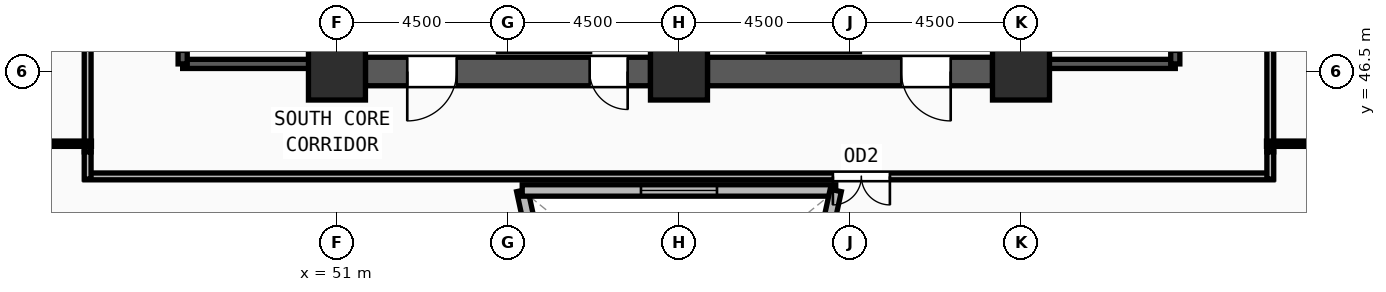
"""IFC4 building model, lengths in metres.
Left out: names, types, materials, properties, quantities, classifications, styles, units other than length and angle.
Written with IfcOpenShell. Run it as: python <this file> out.ifc"""

import sys

from ifc_helpers import new_model, si_unit, direction, frame, frame_2d, origin, origin_2d, place, context, subcontext, project, spatial, rectangle, extrude, source, transform, mapped, element, fill, save


model = new_model("IFC4")
c1 = context("Model", 3, precision=1e-05, world=origin(), true_north=direction((0.0, 1.0)))
c2 = subcontext(c1, "Body", "Model", "MODEL_VIEW")
j1 = project(units=[si_unit("LENGTHUNIT", "METRE"), si_unit("PLANEANGLEUNIT", "RADIAN")], contexts=[c1])
p1 = place(None, origin())
s1 = spatial("IfcSite", under=j1, at=p1, CompositionType="ELEMENT")
p2 = place(p1, origin())
s2 = spatial("IfcBuilding", under=s1, at=p2, CompositionType="ELEMENT")
p3 = place(p2, frame((0.0, 0.0, 113.25)))
s3 = spatial("IfcBuildingStorey", under=s2, at=p3, CompositionType="ELEMENT", Elevation=113.25)
m1 = source(origin(), c2, "Body", "SweptSolid", [
    extrude(rectangle(XDim=1.5, YDim=1.5, at=origin_2d()), origin(), (0.0, 0.0, 1.0), 3.75),
])
for number, where, z_axis, x_axis in (
    (1, (51.0, 46.5, 0.0), (0.0, 0.0, 1.0), (1.0, 0.0, 0.0)),
    (2, (60.0, 46.5, 0.0), (0.0, 0.0, 1.0), (1.0, 0.0, 0.0)),
    (3, (69.0, 46.5, 0.0), (0.0, 0.0, 1.0), (1.0, 0.0, 0.0)),
):
    element("IfcColumn", number, at=place(p3, frame(where, z_axis=z_axis, x_axis=x_axis)), inside=s3, PredefinedType="COLUMN", context=c2, shape_type="MappedRepresentation", body=[
        mapped(m1, transform((0.0, 0.0, 0.0), x_axis=(1.0, 0.0, 0.0), y_axis=(0.0, 1.0, 0.0), z_axis=(0.0, 0.0, 1.0), scale=1.0)),
    ])
p4 = place(p3, frame((68.25, 46.5, 0.0), z_axis=(0.0, 0.0, 1.0), x_axis=(-1.0, 0.0, 0.0)))
e4 = element("IfcWall", 4, at=p4, inside=s3, PredefinedType="SHEAR", context=c2, shape_type="SweptSolid", body=[
    extrude(rectangle(XDim=7.5, YDim=0.75, at=frame_2d((3.75, 0.0))), origin(), (0.0, 0.0, 1.0), 3.57),
])
m2 = source(origin(), c2, "Body", "SweptSolid", [
    extrude(rectangle(XDim=1.3, YDim=2.2, at=frame_2d((0.65, 1.1))), frame((0.0, 0.385, 0.0), z_axis=(0.0, -1.0, 0.0), x_axis=(1.0, 0.0, 0.0)), (0.0, 0.0, 1.0), 0.77),
])
p5 = place(p4, frame((1.1, 0.0, 0.0)))
e5 = element("IfcOpeningElement", 5, at=p5, cuts=e4, PredefinedType="OPENING", context=c2, shape_type="MappedRepresentation", body=[
    mapped(m2, transform((0.0, 0.0, 0.0), x_axis=(1.0, 0.0, 0.0), y_axis=(0.0, 1.0, 0.0), z_axis=(0.0, 0.0, 1.0), scale=1.0)),
])
p6 = place(p3, frame((59.25, 46.5, 0.0), z_axis=(0.0, 0.0, 1.0), x_axis=(-1.0, 0.0, 0.0)))
e6 = element("IfcWall", 6, at=p6, inside=s3, PredefinedType="SHEAR", context=c2, shape_type="SweptSolid", body=[
    extrude(rectangle(XDim=7.5, YDim=0.75, at=frame_2d((3.75, 0.0))), origin(), (0.0, 0.0, 1.0), 3.57),
])
p7 = place(p6, frame((5.1, 0.0, 0.0)))
e7 = element("IfcOpeningElement", 7, at=p7, cuts=e6, PredefinedType="OPENING", context=c2, shape_type="MappedRepresentation", body=[
    mapped(m2, transform((0.0, 0.0, 0.0), x_axis=(1.0, 0.0, 0.0), y_axis=(0.0, 1.0, 0.0), z_axis=(0.0, 0.0, 1.0), scale=1.0)),
])
m3 = source(origin(), c2, "Body", "SweptSolid", [
    extrude(rectangle(XDim=1.0, YDim=2.2, at=frame_2d((0.5, 1.1))), frame((0.0, 0.385, 0.0), z_axis=(0.0, -1.0, 0.0), x_axis=(1.0, 0.0, 0.0)), (0.0, 0.0, 1.0), 0.77),
])
p8 = place(p6, frame((0.6, 0.0, 0.0)))
e8 = element("IfcOpeningElement", 8, at=p8, cuts=e6, PredefinedType="OPENING", context=c2, shape_type="MappedRepresentation", body=[
    mapped(m3, transform((0.0, 0.0, 0.0), x_axis=(1.0, 0.0, 0.0), y_axis=(0.0, 1.0, 0.0), z_axis=(0.0, 0.0, 1.0), scale=1.0)),
])
p9 = place(p3, frame((46.94, 46.7, 0.0), z_axis=(0.0, 0.0, 1.0), x_axis=(1.0, 0.0, 0.0)))
e9 = element("IfcWall", 9, at=p9, inside=s3, PredefinedType="SOLIDWALL", context=c2, shape_type="SweptSolid", body=[
    extrude(rectangle(XDim=3.44, YDim=0.24, at=frame_2d((1.72, 0.0))), origin(), (0.0, 0.0, 1.0), 3.57),
])
p10 = place(p3, frame((50.38, 46.7, 0.0), z_axis=(0.0, 0.0, 1.0), x_axis=(0.0, 1.0, 0.0)))
e10 = element("IfcWall", 10, at=p10, inside=s3, PredefinedType="SOLIDWALL", context=c2, shape_type="SweptSolid", body=[
    extrude(rectangle(XDim=7.82, YDim=0.24, at=frame_2d((3.91, 0.0))), origin(), (0.0, 0.0, 1.0), 3.57),
])
p11 = place(p3, frame((46.94, 54.52, 0.0), z_axis=(0.0, 0.0, 1.0), x_axis=(0.0, -1.0, 0.0)))
e11 = element("IfcWall", 11, at=p11, inside=s3, PredefinedType="SOLIDWALL", context=c2, shape_type="SweptSolid", body=[
    extrude(rectangle(XDim=7.82, YDim=0.24, at=frame_2d((3.91, 0.0))), origin(), (0.0, 0.0, 1.0), 3.57),
])
m4 = source(origin(), c2, "Body", "SweptSolid", [
    extrude(rectangle(XDim=1.2, YDim=2.2, at=frame_2d((0.6, 1.1))), frame((0.0, 0.13, 0.0), z_axis=(0.0, -1.0, 0.0), x_axis=(1.0, 0.0, 0.0)), (0.0, 0.0, 1.0), 0.26),
])
p12 = place(p11, frame((6.3, 0.0, 0.0)))
e12 = element("IfcOpeningElement", 12, at=p12, cuts=e11, PredefinedType="OPENING", context=c2, shape_type="MappedRepresentation", body=[
    mapped(m4, transform((0.0, 0.0, 0.0), x_axis=(1.0, 0.0, 0.0), y_axis=(0.0, 1.0, 0.0), z_axis=(0.0, 0.0, 1.0), scale=1.0)),
])
p13 = place(p3, frame((69.62, 46.7, 0.0), z_axis=(0.0, 0.0, 1.0), x_axis=(1.0, 0.0, 0.0)))
e13 = element("IfcWall", 13, at=p13, inside=s3, PredefinedType="SOLIDWALL", context=c2, shape_type="SweptSolid", body=[
    extrude(rectangle(XDim=3.44, YDim=0.24, at=frame_2d((1.72, 0.0))), origin(), (0.0, 0.0, 1.0), 3.57),
])
p14 = place(p3, frame((73.06, 46.7, 0.0), z_axis=(0.0, 0.0, 1.0), x_axis=(0.0, 1.0, 0.0)))
e14 = element("IfcWall", 14, at=p14, inside=s3, PredefinedType="SOLIDWALL", context=c2, shape_type="SweptSolid", body=[
    extrude(rectangle(XDim=7.82, YDim=0.24, at=frame_2d((3.91, 0.0))), origin(), (0.0, 0.0, 1.0), 3.57),
])
p15 = place(p14, frame((0.32, 0.0, 0.0)))
e15 = element("IfcOpeningElement", 15, at=p15, cuts=e14, PredefinedType="OPENING", context=c2, shape_type="MappedRepresentation", body=[
    mapped(m4, transform((0.0, 0.0, 0.0), x_axis=(1.0, 0.0, 0.0), y_axis=(0.0, 1.0, 0.0), z_axis=(0.0, 0.0, 1.0), scale=1.0)),
])
p16 = place(p3, frame((69.62, 54.52, 0.0), z_axis=(0.0, 0.0, 1.0), x_axis=(0.0, -1.0, 0.0)))
e16 = element("IfcWall", 16, at=p16, inside=s3, PredefinedType="SOLIDWALL", context=c2, shape_type="SweptSolid", body=[
    extrude(rectangle(XDim=7.82, YDim=0.24, at=frame_2d((3.91, 0.0))), origin(), (0.0, 0.0, 1.0), 3.57),
])
p17 = place(p3, frame((57.319, 36.692, 0.0), z_axis=(0.0, 0.0, 1.0), x_axis=(-0.211354012172, 0.977409577168, 0.0)))
e17 = element("IfcWall", 17, at=p17, inside=s3, PredefinedType="SOLIDWALL", context=c2, shape_type="SweptSolid", body=[
    extrude(rectangle(XDim=6.833, YDim=0.3, at=frame_2d((3.416, 0.0))), origin(), (0.0, 0.0, 1.0), 3.57),
])
m5 = source(origin(), c2, "Body", "SweptSolid", [
    extrude(rectangle(XDim=2.0, YDim=1.9, at=frame_2d((1.0, 0.95))), frame((0.0, 0.16, 0.0), z_axis=(0.0, -1.0, 0.0), x_axis=(1.0, 0.0, 0.0)), (0.0, 0.0, 1.0), 0.32),
])
p18 = place(p17, frame((2.416, 0.0, 0.55)))
e18 = element("IfcOpeningElement", 18, at=p18, cuts=e17, PredefinedType="OPENING", context=c2, shape_type="MappedRepresentation", body=[
    mapped(m5, transform((0.0, 0.0, 0.0), x_axis=(1.0, 0.0, 0.0), y_axis=(0.0, 1.0, 0.0), z_axis=(0.0, 0.0, 1.0), scale=1.0)),
])
p19 = place(p3, frame((55.875, 43.37, 0.0), z_axis=(0.0, 0.0, 1.0), x_axis=(1.0, 0.0, 0.0)))
e19 = element("IfcWall", 19, at=p19, inside=s3, PredefinedType="SOLIDWALL", context=c2, shape_type="SweptSolid", body=[
    extrude(rectangle(XDim=8.25, YDim=0.3, at=frame_2d((4.125, 0.0))), origin(), (0.0, 0.0, 1.0), 3.57),
])
p20 = place(p19, frame((3.125, 0.0, 0.55)))
e20 = element("IfcOpeningElement", 20, at=p20, cuts=e19, PredefinedType="OPENING", context=c2, shape_type="MappedRepresentation", body=[
    mapped(m5, transform((0.0, 0.0, 0.0), x_axis=(1.0, 0.0, 0.0), y_axis=(0.0, 1.0, 0.0), z_axis=(0.0, 0.0, 1.0), scale=1.0)),
])
p21 = place(p3, frame((64.125, 43.37, 0.0), z_axis=(0.0, 0.0, 1.0), x_axis=(-0.211354012172, -0.977409577168, 0.0)))
e21 = element("IfcWall", 21, at=p21, inside=s3, PredefinedType="SOLIDWALL", context=c2, shape_type="SweptSolid", body=[
    extrude(rectangle(XDim=6.833, YDim=0.3, at=frame_2d((3.416, 0.0))), origin(), (0.0, 0.0, 1.0), 3.57),
])
p22 = place(p21, frame((2.416, 0.0, 0.55)))
e22 = element("IfcOpeningElement", 22, at=p22, cuts=e21, PredefinedType="OPENING", context=c2, shape_type="MappedRepresentation", body=[
    mapped(m5, transform((0.0, 0.0, 0.0), x_axis=(1.0, 0.0, 0.0), y_axis=(0.0, 1.0, 0.0), z_axis=(0.0, 0.0, 1.0), scale=1.0)),
])
p23 = place(p3, frame((44.44, 44.385, 0.0), z_axis=(0.0, 0.0, 1.0), x_axis=(0.0, 1.0, 0.0)))
e23 = element("IfcWall", 23, at=p23, inside=s3, PredefinedType="PARTITIONING", context=c2, shape_type="SweptSolid", body=[
    extrude(rectangle(XDim=7.83, YDim=0.18, at=frame_2d((3.915, 0.0))), origin(), (0.0, 0.0, 1.0), 3.57),
])
m6 = source(origin(), c2, "Body", "SweptSolid", [
    extrude(rectangle(XDim=1.0, YDim=2.2, at=frame_2d((0.5, 1.1))), frame((0.0, 0.1, 0.0), z_axis=(0.0, -1.0, 0.0), x_axis=(1.0, 0.0, 0.0)), (0.0, 0.0, 1.0), 0.2),
])
p24 = place(p23, frame((3.415, 0.0, 0.0)))
e24 = element("IfcOpeningElement", 24, at=p24, cuts=e23, PredefinedType="OPENING", context=c2, shape_type="MappedRepresentation", body=[
    mapped(m6, transform((0.0, 0.0, 0.0), x_axis=(1.0, 0.0, 0.0), y_axis=(0.0, 1.0, 0.0), z_axis=(0.0, 0.0, 1.0), scale=1.0)),
])
p25 = place(p3, frame((75.63, 43.74, 0.0), z_axis=(0.0, 0.0, 1.0), x_axis=(-1.0, 0.0, 0.0)))
e25 = element("IfcWall", 25, at=p25, inside=s3, PredefinedType="PARTITIONING", context=c2, shape_type="SweptSolid", body=[
    extrude(rectangle(XDim=31.26, YDim=0.18, at=frame_2d((15.63, 0.0))), origin(), (0.0, 0.0, 1.0), 3.57),
])
m7 = source(origin(), c2, "Body", "SweptSolid", [
    extrude(rectangle(XDim=1.5, YDim=2.2, at=frame_2d((0.75, 1.1))), frame((0.0, 0.1, 0.0), z_axis=(0.0, -1.0, 0.0), x_axis=(1.0, 0.0, 0.0)), (0.0, 0.0, 1.0), 0.2),
])
p26 = place(p25, frame((10.08, 0.0, 0.0)))
e26 = element("IfcOpeningElement", 26, at=p26, cuts=e25, PredefinedType="OPENING", context=c2, shape_type="MappedRepresentation", body=[
    mapped(m7, transform((0.0, 0.0, 0.0), x_axis=(1.0, 0.0, 0.0), y_axis=(0.0, 1.0, 0.0), z_axis=(0.0, 0.0, 1.0), scale=1.0)),
])
p27 = place(p3, frame((75.56, 50.715, 0.0), z_axis=(0.0, 0.0, 1.0), x_axis=(0.0, -1.0, 0.0)))
e27 = element("IfcWall", 27, at=p27, inside=s3, PredefinedType="PARTITIONING", context=c2, shape_type="SweptSolid", body=[
    extrude(rectangle(XDim=6.33, YDim=0.18, at=frame_2d((3.165, 0.0))), origin(), (0.0, 0.0, 1.0), 3.155),
])
p28 = place(p27, frame((2.665, 0.0, 0.0)))
e28 = element("IfcOpeningElement", 28, at=p28, cuts=e27, PredefinedType="OPENING", context=c2, shape_type="MappedRepresentation", body=[
    mapped(m6, transform((0.0, 0.0, 0.0), x_axis=(1.0, 0.0, 0.0), y_axis=(0.0, 1.0, 0.0), z_axis=(0.0, 0.0, 1.0), scale=1.0)),
])
for number, where, z_axis, x_axis in (
    (29, (44.44, 43.67, 0.0), (0.0, 0.0, 1.0), (0.0, 1.0, 0.0)),
    (30, (75.56, 44.385, 0.0), (0.0, 0.0, 1.0), (0.0, -1.0, 0.0)),
):
    element("IfcWall", number, at=place(p3, frame(where, z_axis=z_axis, x_axis=x_axis)), inside=s3, PredefinedType="PARTITIONING", context=c2, shape_type="SweptSolid", body=[
        extrude(rectangle(XDim=0.715, YDim=0.18, at=frame_2d((0.357, 0.0))), origin(), (0.0, 0.0, 1.0), 3.57),
    ])
p29 = place(p3, frame((44.54, 44.6, 0.0), z_axis=(0.0, 0.0, 1.0), x_axis=(-1.0, 0.0, 0.0)))
e31 = element("IfcWall", 31, at=p29, inside=s3, PredefinedType="PARTITIONING", context=c2, shape_type="SweptSolid", body=[
    extrude(rectangle(XDim=9.919, YDim=0.14, at=frame_2d((4.959, 0.0))), origin(), (0.0, 0.0, 1.0), 3.57),
])
p30 = place(p3, frame((75.46, 44.6, 0.0), z_axis=(0.0, 0.0, 1.0), x_axis=(1.0, 0.0, 0.0)))
e32 = element("IfcWall", 32, at=p30, inside=s3, PredefinedType="PARTITIONING", context=c2, shape_type="SweptSolid", body=[
    extrude(rectangle(XDim=10.259, YDim=0.14, at=frame_2d((5.129, 0.0))), origin(), (0.0, 0.0, 1.0), 3.57),
])
m8 = source(origin(), c2, "Body", "SweptSolid", [
    extrude(rectangle(XDim=1.3, YDim=2.2, at=frame_2d((0.65, 1.1))), frame((0.0, 0.025, 0.0), z_axis=(0.0, -1.0, 0.0), x_axis=(1.0, 0.0, 0.0)), (0.0, 0.0, 1.0), 0.05),
])
p31 = place(p7, origin())
e33 = element("IfcDoor", 33, at=p31, inside=s3, OperationType="SINGLE_SWING_RIGHT", PredefinedType="DOOR", context=c2, shape_type="MappedRepresentation", body=[
    mapped(m8, transform((0.0, 0.0, 0.0), x_axis=(1.0, 0.0, 0.0), y_axis=(0.0, 1.0, 0.0), z_axis=(0.0, 0.0, 1.0), scale=1.0)),
])
fill(e7, e33)
m9 = source(origin(), c2, "Body", "SweptSolid", [
    extrude(rectangle(XDim=1.0, YDim=2.2, at=frame_2d((0.5, 1.1))), frame((0.0, 0.025, 0.0), z_axis=(0.0, -1.0, 0.0), x_axis=(1.0, 0.0, 0.0)), (0.0, 0.0, 1.0), 0.05),
])
p32 = place(p8, origin())
e34 = element("IfcDoor", 34, at=p32, inside=s3, OperationType="SINGLE_SWING_LEFT", PredefinedType="DOOR", context=c2, shape_type="MappedRepresentation", body=[
    mapped(m9, transform((0.0, 0.0, 0.0), x_axis=(1.0, 0.0, 0.0), y_axis=(0.0, 1.0, 0.0), z_axis=(0.0, 0.0, 1.0), scale=1.0)),
])
fill(e8, e34)
p33 = place(p5, origin())
e35 = element("IfcDoor", 35, at=p33, inside=s3, OperationType="SINGLE_SWING_LEFT", PredefinedType="DOOR", context=c2, shape_type="MappedRepresentation", body=[
    mapped(m8, transform((0.0, 0.0, 0.0), x_axis=(1.0, 0.0, 0.0), y_axis=(0.0, 1.0, 0.0), z_axis=(0.0, 0.0, 1.0), scale=1.0)),
])
fill(e5, e35)
m10 = source(origin(), c2, "Body", "SweptSolid", [
    extrude(rectangle(XDim=2.0, YDim=1.9, at=frame_2d((1.0, 0.95))), frame((0.0, 0.03, 0.0), z_axis=(0.0, -1.0, 0.0), x_axis=(1.0, 0.0, 0.0)), (0.0, 0.0, 1.0), 0.06),
])
p34 = place(p20, origin())
e36 = element("IfcWindow", 36, at=p34, inside=s3, PartitioningType="DOUBLE_PANEL_VERTICAL", PredefinedType="WINDOW", context=c2, shape_type="MappedRepresentation", body=[
    mapped(m10, transform((0.0, 0.0, 0.0), x_axis=(1.0, 0.0, 0.0), y_axis=(0.0, 1.0, 0.0), z_axis=(0.0, 0.0, 1.0), scale=1.0)),
])
fill(e20, e36)
m11 = source(origin(), c2, "Body", "SweptSolid", [
    extrude(rectangle(XDim=1.5, YDim=2.2, at=frame_2d((0.75, 1.1))), frame((0.0, 0.025, 0.0), z_axis=(0.0, -1.0, 0.0), x_axis=(1.0, 0.0, 0.0)), (0.0, 0.0, 1.0), 0.05),
])
p35 = place(p26, origin())
e37 = element("IfcDoor", 37, at=p35, inside=s3, OperationType="DOUBLE_DOOR_SINGLE_SWING", PredefinedType="DOOR", context=c2, shape_type="MappedRepresentation", body=[
    mapped(m11, transform((0.0, 0.0, 0.0), x_axis=(1.0, 0.0, 0.0), y_axis=(0.0, 1.0, 0.0), z_axis=(0.0, 0.0, 1.0), scale=1.0)),
])
fill(e26, e37)
save(model, sys.argv[1])
